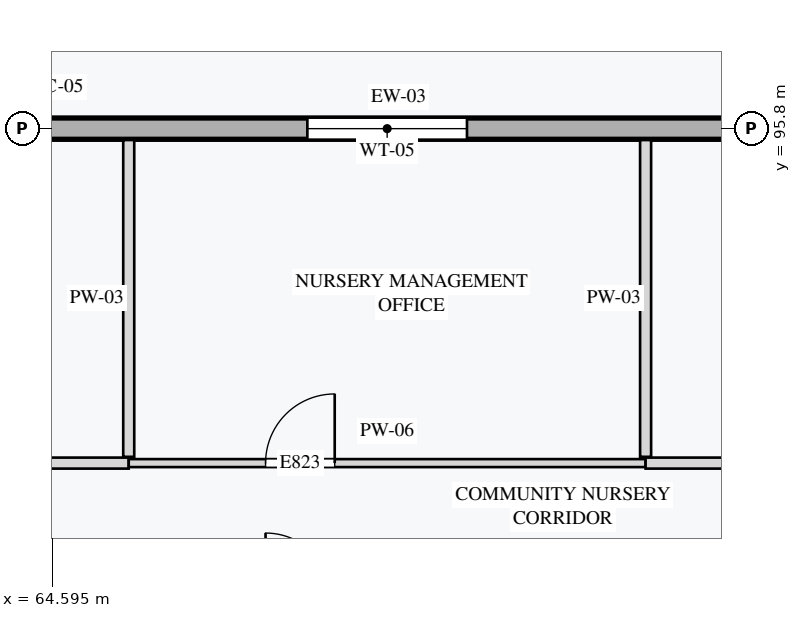
"""IFC4 building model, lengths in metres.
Left out: names, types, materials, properties, quantities, classifications, styles, units other than length and angle.
Written with IfcOpenShell. Run it as: python <this file> out.ifc"""

import sys

from ifc_helpers import new_model, si_unit, direction, frame, frame_2d, origin, place, context, subcontext, project, spatial, rectangle, extrude, element, fill, save


model = new_model("IFC4")
c1 = context("Model", 3, precision=1e-05, world=origin(), true_north=direction((0.0, 1.0)))
c2 = subcontext(c1, "Body", "Model", "MODEL_VIEW")
j1 = project(units=[si_unit("LENGTHUNIT", "METRE"), si_unit("PLANEANGLEUNIT", "RADIAN")], contexts=[c1])
p1 = place(None, origin())
s1 = spatial("IfcSite", under=j1, at=p1, CompositionType="ELEMENT")
p2 = place(p1, origin())
s2 = spatial("IfcBuilding", under=s1, at=p2, CompositionType="ELEMENT")
p3 = place(p2, frame((0.0, 0.0, 4.2)))
s3 = spatial("IfcBuildingStorey", under=s2, at=p3, CompositionType="ELEMENT", Elevation=4.2)
p4 = place(p3, frame((64.4, 95.8, 0.0), z_axis=(0.0, 0.0, 1.0), x_axis=(1.0, 0.0, 0.0)))
e1 = element("IfcWall", 1, at=p4, inside=s3, PredefinedType="STANDARD", context=c2, shape_type="SweptSolid", body=[
    extrude(rectangle(XDim=9.5, YDim=0.28, at=frame_2d((4.75, 0.0))), origin(), (0.0, 0.0, 1.0), 3.45),
])
p5 = place(p4, frame((3.55, 0.0, 0.85)))
e2 = element("IfcOpeningElement", 2, at=p5, cuts=e1, PredefinedType="OPENING", context=c2, shape_type="SweptSolid", body=[
    extrude(rectangle(XDim=2.1, YDim=1.55, at=frame_2d((1.05, 0.775))), frame((0.0, 0.15, 0.0), z_axis=(0.0, -1.0, 0.0), x_axis=(1.0, 0.0, 0.0)), (0.0, 0.0, 1.0), 0.3),
])
p6 = place(p3, frame((56.6, 91.4, 0.0), z_axis=(0.0, 0.0, 1.0), x_axis=(1.0, 0.0, 0.0)))
e3 = element("IfcWall", 3, at=p6, inside=s3, PredefinedType="PARTITIONING", context=c2, shape_type="SweptSolid", body=[
    extrude(rectangle(XDim=9.0, YDim=0.145, at=frame_2d((4.5, 0.0))), origin(), (0.0, 0.0, 1.0), 3.94),
])
p7 = place(p6, frame((1.6, 0.0, 0.0)))
e4 = element("IfcOpeningElement", 4, at=p7, cuts=e3, PredefinedType="OPENING", context=c2, shape_type="SweptSolid", body=[
    extrude(rectangle(XDim=0.86, YDim=2.12, at=frame_2d((0.43, 1.06))), frame((0.0, 0.083, 0.0), z_axis=(0.0, -1.0, 0.0), x_axis=(1.0, 0.0, 0.0)), (0.0, 0.0, 1.0), 0.165),
])
p8 = place(p3, frame((65.6, 91.4, 0.0), z_axis=(0.0, 0.0, 1.0), x_axis=(1.0, 0.0, 0.0)))
e5 = element("IfcWall", 5, at=p8, inside=s3, PredefinedType="PARTITIONING", context=c2, shape_type="SweptSolid", body=[
    extrude(rectangle(XDim=6.8, YDim=0.105, at=frame_2d((3.4, 0.0))), origin(), (0.0, 0.0, 1.0), 3.94),
])
p9 = place(p8, frame((1.8, 0.0, 0.0)))
e6 = element("IfcOpeningElement", 6, at=p9, cuts=e5, PredefinedType="OPENING", context=c2, shape_type="SweptSolid", body=[
    extrude(rectangle(XDim=0.91, YDim=2.14, at=frame_2d((0.455, 1.07))), frame((0.0, 0.062, 0.0), z_axis=(0.0, -1.0, 0.0), x_axis=(1.0, 0.0, 0.0)), (0.0, 0.0, 1.0), 0.125),
])
p10 = place(p3, frame((65.6, 91.482, 0.0), z_axis=(0.0, 0.0, 1.0), x_axis=(0.0, 1.0, 0.0)))
e7 = element("IfcWall", 7, at=p10, inside=s3, PredefinedType="PARTITIONING", context=c2, shape_type="SweptSolid", body=[
    extrude(rectangle(XDim=4.167, YDim=0.145, at=frame_2d((2.084, 0.0))), origin(), (0.0, 0.0, 1.0), 3.94),
])
p11 = place(p3, frame((72.4, 91.4, 0.0), z_axis=(0.0, 0.0, 1.0), x_axis=(1.0, 0.0, 0.0)))
e8 = element("IfcWall", 8, at=p11, inside=s3, PredefinedType="PARTITIONING", context=c2, shape_type="SweptSolid", body=[
    extrude(rectangle(XDim=6.2, YDim=0.145, at=frame_2d((3.1, 0.0))), origin(), (0.0, 0.0, 1.0), 3.94),
])
p12 = place(p11, frame((1.8, 0.0, 0.0)))
e9 = element("IfcOpeningElement", 9, at=p12, cuts=e8, PredefinedType="OPENING", context=c2, shape_type="SweptSolid", body=[
    extrude(rectangle(XDim=0.87, YDim=2.08, at=frame_2d((0.435, 1.04))), frame((0.0, 0.083, 0.0), z_axis=(0.0, -1.0, 0.0), x_axis=(1.0, 0.0, 0.0)), (0.0, 0.0, 1.0), 0.165),
])
p13 = place(p3, frame((72.4, 91.482, 0.0), z_axis=(0.0, 0.0, 1.0), x_axis=(0.0, 1.0, 0.0)))
e10 = element("IfcWall", 10, at=p13, inside=s3, PredefinedType="PARTITIONING", context=c2, shape_type="SweptSolid", body=[
    extrude(rectangle(XDim=4.167, YDim=0.145, at=frame_2d((2.084, 0.0))), origin(), (0.0, 0.0, 1.0), 3.94),
])
p14 = place(p5, origin())
e11 = element("IfcWindow", 11, at=p14, inside=s3, PartitioningType="SINGLE_PANEL", PredefinedType="WINDOW", context=c2, shape_type="SweptSolid", body=[
    extrude(rectangle(XDim=2.1, YDim=1.55, at=frame_2d((1.05, 0.775))), frame((0.0, 0.03, 0.0), z_axis=(0.0, -1.0, 0.0), x_axis=(1.0, 0.0, 0.0)), (0.0, 0.0, 1.0), 0.06),
])
fill(e2, e11)
p15 = place(p9, origin())
e12 = element("IfcDoor", 12, at=p15, inside=s3, OperationType="SINGLE_SWING_RIGHT", PredefinedType="DOOR", context=c2, shape_type="SweptSolid", body=[
    extrude(rectangle(XDim=0.91, YDim=2.14, at=frame_2d((0.455, 1.07))), frame((0.0, 0.025, 0.0), z_axis=(0.0, -1.0, 0.0), x_axis=(1.0, 0.0, 0.0)), (0.0, 0.0, 1.0), 0.05),
])
fill(e6, e12)
save(model, sys.argv[1])
